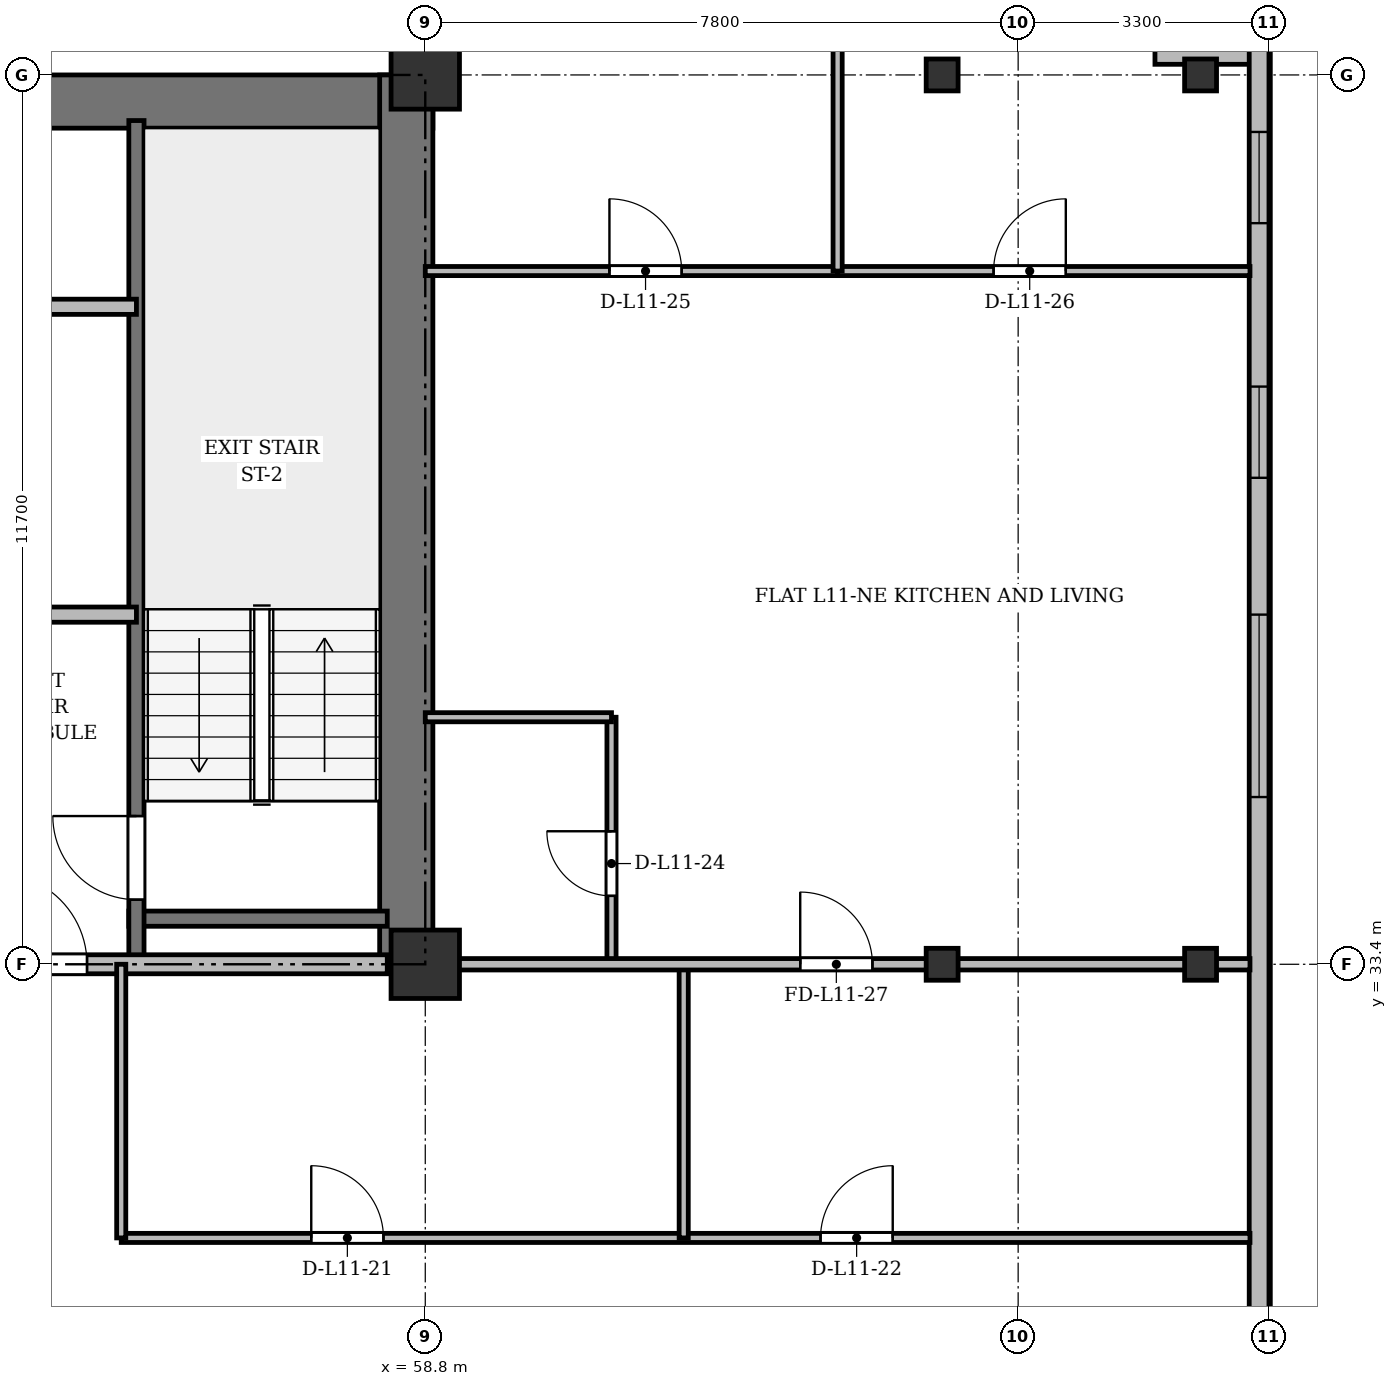
"""IFC4 building model, lengths in metres.
Left out: names, types, materials, properties, quantities, classifications, styles, units other than length and angle.
Written with IfcOpenShell. Run it as: python <this file> out.ifc"""

import sys

from ifc_helpers import new_model, si_unit, direction, frame, frame_2d, origin, origin_2d, place, context, subcontext, project, spatial, rectangle, i_section, extrude, source, transform, mapped, element, fill, save


model = new_model("IFC4")
c1 = context("Model", 3, precision=1e-05, world=origin(), true_north=direction((0.0, 1.0)))
c2 = subcontext(c1, "Body", "Model", "MODEL_VIEW")
j1 = project(units=[si_unit("LENGTHUNIT", "METRE"), si_unit("PLANEANGLEUNIT", "RADIAN")], contexts=[c1])
p1 = place(None, origin())
s1 = spatial("IfcSite", under=j1, at=p1, CompositionType="ELEMENT")
p2 = place(p1, origin())
s2 = spatial("IfcBuilding", under=s1, at=p2, CompositionType="ELEMENT")
p3 = place(p2, frame((0.0, 0.0, 45.1)))
s3 = spatial("IfcBuildingStorey", under=s2, at=p3, CompositionType="ELEMENT", Elevation=45.1)
m1 = source(origin(), c2, "Body", "SweptSolid", [
    extrude(rectangle(XDim=0.9, YDim=0.9, at=origin_2d()), origin(), (0.0, 0.0, 1.0), 3.6),
])
for number, where, z_axis, x_axis in (
    (1, (58.8, 33.4, 0.0), (0.0, 0.0, 1.0), (1.0, 0.0, 0.0)),
    (2, (58.8, 45.1, 0.0), (0.0, 0.0, 1.0), (1.0, 0.0, 0.0)),
):
    element("IfcColumn", number, at=place(p3, frame(where, z_axis=z_axis, x_axis=x_axis)), inside=s3, PredefinedType="COLUMN", context=c2, shape_type="MappedRepresentation", body=[
        mapped(m1, transform((0.0, 0.0, 0.0), x_axis=(1.0, 0.0, 0.0), y_axis=(0.0, 1.0, 0.0), z_axis=(0.0, 0.0, 1.0), scale=1.0)),
    ])
m2 = source(origin(), c2, "Body", "SweptSolid", [
    extrude(i_section(OverallWidth=0.42, OverallDepth=0.42, WebThickness=0.026, FlangeThickness=0.04, at=origin_2d()), origin(), (0.0, 0.0, 1.0), 3.6),
])
for number, where, z_axis, x_axis in (
    (3, (65.6, 33.4, 0.0), (0.0, 0.0, 1.0), (1.0, 0.0, 0.0)),
    (4, (65.6, 45.1, 0.0), (0.0, 0.0, 1.0), (1.0, 0.0, 0.0)),
    (5, (69.0, 33.4, 0.0), (0.0, 0.0, 1.0), (1.0, 0.0, 0.0)),
    (6, (69.0, 45.1, 0.0), (0.0, 0.0, 1.0), (1.0, 0.0, 0.0)),
):
    element("IfcColumn", number, at=place(p3, frame(where, z_axis=z_axis, x_axis=x_axis)), inside=s3, PredefinedType="COLUMN", context=c2, shape_type="MappedRepresentation", body=[
        mapped(m2, transform((0.0, 0.0, 0.0), x_axis=(1.0, 0.0, 0.0), y_axis=(0.0, 1.0, 0.0), z_axis=(0.0, 0.0, 1.0), scale=1.0)),
    ])
p4 = place(p3, frame((68.4, 45.37, 0.0), z_axis=(0.0, 0.0, 1.0), x_axis=(1.0, 0.0, 0.0)))
e7 = element("IfcWall", 7, at=p4, inside=s3, PredefinedType="SOLIDWALL", context=c2, shape_type="SweptSolid", body=[
    extrude(rectangle(XDim=1.5, YDim=0.26, at=frame_2d((0.75, 0.0))), origin(), (0.0, 0.0, 1.0), 2.69),
])
p5 = place(p3, frame((69.77, 45.5, 0.0), z_axis=(0.0, 0.0, 1.0), x_axis=(0.0, -1.0, 0.0)))
e8 = element("IfcWall", 8, at=p5, inside=s3, PredefinedType="SOLIDWALL", context=c2, shape_type="SweptSolid", body=[
    extrude(rectangle(XDim=39.6, YDim=0.26, at=frame_2d((19.8, 0.0))), origin(), (0.0, 0.0, 1.0), 3.34),
])
p6 = place(p5, frame((36.95, 0.0, 0.92)))
e9 = element("IfcOpeningElement", 9, at=p6, cuts=e8, PredefinedType="OPENING", context=c2, shape_type="SweptSolid", body=[
    extrude(rectangle(XDim=1.2, YDim=1.65, at=frame_2d((0.6, 0.825))), frame((0.0, 0.14, 0.0), z_axis=(0.0, -1.0, 0.0), x_axis=(1.0, 0.0, 0.0)), (0.0, 0.0, 1.0), 0.28),
])
p7 = place(p5, frame((32.9, 0.0, 0.92)))
e10 = element("IfcOpeningElement", 10, at=p7, cuts=e8, PredefinedType="OPENING", context=c2, shape_type="SweptSolid", body=[
    extrude(rectangle(XDim=2.4, YDim=2.1, at=frame_2d((1.2, 1.05))), frame((0.0, 0.14, 0.0), z_axis=(0.0, -1.0, 0.0), x_axis=(1.0, 0.0, 0.0)), (0.0, 0.0, 1.0), 0.28),
])
p8 = place(p5, frame((28.7, 0.0, 0.92)))
e11 = element("IfcOpeningElement", 11, at=p8, cuts=e8, PredefinedType="OPENING", context=c2, shape_type="SweptSolid", body=[
    extrude(rectangle(XDim=2.4, YDim=2.1, at=frame_2d((1.2, 1.05))), frame((0.0, 0.14, 0.0), z_axis=(0.0, -1.0, 0.0), x_axis=(1.0, 0.0, 0.0)), (0.0, 0.0, 1.0), 0.28),
])
p9 = place(p5, frame((21.5, 0.0, 0.92)))
e12 = element("IfcOpeningElement", 12, at=p9, cuts=e8, PredefinedType="OPENING", context=c2, shape_type="SweptSolid", body=[
    extrude(rectangle(XDim=2.4, YDim=2.1, at=frame_2d((1.2, 1.05))), frame((0.0, 0.14, 0.0), z_axis=(0.0, -1.0, 0.0), x_axis=(1.0, 0.0, 0.0)), (0.0, 0.0, 1.0), 0.28),
])
p10 = place(p5, frame((7.5, 0.0, 0.92)))
e13 = element("IfcOpeningElement", 13, at=p10, cuts=e8, PredefinedType="OPENING", context=c2, shape_type="SweptSolid", body=[
    extrude(rectangle(XDim=2.4, YDim=2.1, at=frame_2d((1.2, 1.05))), frame((0.0, 0.14, 0.0), z_axis=(0.0, -1.0, 0.0), x_axis=(1.0, 0.0, 0.0)), (0.0, 0.0, 1.0), 0.28),
])
p11 = place(p5, frame((4.5, 0.0, 0.92)))
e14 = element("IfcOpeningElement", 14, at=p11, cuts=e8, PredefinedType="OPENING", context=c2, shape_type="SweptSolid", body=[
    extrude(rectangle(XDim=1.2, YDim=1.65, at=frame_2d((0.6, 0.825))), frame((0.0, 0.14, 0.0), z_axis=(0.0, -1.0, 0.0), x_axis=(1.0, 0.0, 0.0)), (0.0, 0.0, 1.0), 0.28),
])
p12 = place(p5, frame((1.15, 0.0, 0.92)))
e15 = element("IfcOpeningElement", 15, at=p12, cuts=e8, PredefinedType="OPENING", context=c2, shape_type="SweptSolid", body=[
    extrude(rectangle(XDim=1.2, YDim=1.65, at=frame_2d((0.6, 0.825))), frame((0.0, 0.14, 0.0), z_axis=(0.0, -1.0, 0.0), x_axis=(1.0, 0.0, 0.0)), (0.0, 0.0, 1.0), 0.28),
])
p13 = place(p3, frame((15.5, 44.75, 0.0), z_axis=(0.0, 0.0, 1.0), x_axis=(1.0, 0.0, 0.0)))
e16 = element("IfcWall", 16, at=p13, inside=s3, PredefinedType="SHEAR", context=c2, shape_type="SweptSolid", body=[
    extrude(rectangle(XDim=43.4, YDim=0.7, at=frame_2d((21.7, 0.0))), origin(), (0.0, 0.0, 1.0), 3.34),
])
p14 = place(p3, frame((58.55, 33.4, 0.0), z_axis=(0.0, 0.0, 1.0), x_axis=(0.0, 1.0, 0.0)))
e17 = element("IfcWall", 17, at=p14, inside=s3, PredefinedType="SHEAR", context=c2, shape_type="SweptSolid", body=[
    extrude(rectangle(XDim=11.7, YDim=0.7, at=frame_2d((5.85, 0.0))), origin(), (0.0, 0.0, 1.0), 3.34),
])
p15 = place(p3, frame((54.9, 34.0, 0.0), z_axis=(0.0, 0.0, 1.0), x_axis=(1.0, 0.0, 0.0)))
e18 = element("IfcWall", 18, at=p15, inside=s3, PredefinedType="SHEAR", context=c2, shape_type="SweptSolid", body=[
    extrude(rectangle(XDim=3.4, YDim=0.2, at=frame_2d((1.7, 0.0))), origin(), (0.0, 0.0, 1.0), 3.34),
])
p16 = place(p3, frame((55.0, 33.4, 0.0), z_axis=(0.0, 0.0, 1.0), x_axis=(0.0, 1.0, 0.0)))
e19 = element("IfcWall", 19, at=p16, inside=s3, PredefinedType="SHEAR", context=c2, shape_type="SweptSolid", body=[
    extrude(rectangle(XDim=11.1, YDim=0.2, at=frame_2d((5.55, 0.0))), origin(), (0.0, 0.0, 1.0), 3.34),
])
p17 = place(p16, frame((0.85, 0.0, 0.0)))
e20 = element("IfcOpeningElement", 20, at=p17, cuts=e19, PredefinedType="OPENING", context=c2, shape_type="SweptSolid", body=[
    extrude(rectangle(XDim=1.1, YDim=2.15, at=frame_2d((0.55, 1.075))), frame((0.0, 0.11, 0.0), z_axis=(0.0, -1.0, 0.0), x_axis=(1.0, 0.0, 0.0)), (0.0, 0.0, 1.0), 0.22),
])
p18 = place(p3, frame((47.15, 42.05, 0.0), z_axis=(0.0, 0.0, 1.0), x_axis=(1.0, 0.0, 0.0)))
e21 = element("IfcWall", 21, at=p18, inside=s3, PredefinedType="SOLIDWALL", context=c2, shape_type="SweptSolid", body=[
    extrude(rectangle(XDim=7.85, YDim=0.2, at=frame_2d((3.925, 0.0))), origin(), (0.0, 0.0, 1.0), 2.752),
])
p19 = place(p18, frame((0.75, 0.0, 0.0)))
e22 = element("IfcOpeningElement", 22, at=p19, cuts=e21, PredefinedType="OPENING", context=c2, shape_type="SweptSolid", body=[
    extrude(rectangle(XDim=0.9, YDim=2.1, at=frame_2d((0.45, 1.05))), frame((0.0, 0.11, 0.0), z_axis=(0.0, -1.0, 0.0), x_axis=(1.0, 0.0, 0.0)), (0.0, 0.0, 1.0), 0.22),
])
p20 = place(p18, frame((3.85, 0.0, 0.0)))
e23 = element("IfcOpeningElement", 23, at=p20, cuts=e21, PredefinedType="OPENING", context=c2, shape_type="SweptSolid", body=[
    extrude(rectangle(XDim=0.9, YDim=2.1, at=frame_2d((0.45, 1.05))), frame((0.0, 0.11, 0.0), z_axis=(0.0, -1.0, 0.0), x_axis=(1.0, 0.0, 0.0)), (0.0, 0.0, 1.0), 0.22),
])
p21 = place(p3, frame((52.45, 38.0, 0.0), z_axis=(0.0, 0.0, 1.0), x_axis=(1.0, 0.0, 0.0)))
e24 = element("IfcWall", 24, at=p21, inside=s3, PredefinedType="PARTITIONING", context=c2, shape_type="SweptSolid", body=[
    extrude(rectangle(XDim=2.55, YDim=0.2, at=frame_2d((1.275, 0.0))), origin(), (0.0, 0.0, 1.0), 3.34),
])
p22 = place(p3, frame((47.15, 33.4, 0.0), z_axis=(0.0, 0.0, 1.0), x_axis=(1.0, 0.0, 0.0)))
e25 = element("IfcWall", 25, at=p22, inside=s3, PredefinedType="PARTITIONING", context=c2, shape_type="SweptSolid", body=[
    extrude(rectangle(XDim=11.15, YDim=0.25, at=frame_2d((5.575, 0.0))), origin(), (0.0, 0.0, 1.0), 2.69),
])
p23 = place(p22, frame((0.7, 0.0, 0.0)))
e26 = element("IfcOpeningElement", 26, at=p23, cuts=e25, PredefinedType="OPENING", context=c2, shape_type="SweptSolid", body=[
    extrude(rectangle(XDim=0.95, YDim=2.15, at=frame_2d((0.475, 1.075))), frame((0.0, 0.135, 0.0), z_axis=(0.0, -1.0, 0.0), x_axis=(1.0, 0.0, 0.0)), (0.0, 0.0, 1.0), 0.27),
])
p24 = place(p22, frame((6.0, 0.0, 0.0)))
e27 = element("IfcOpeningElement", 27, at=p24, cuts=e25, PredefinedType="OPENING", context=c2, shape_type="SweptSolid", body=[
    extrude(rectangle(XDim=1.2, YDim=2.15, at=frame_2d((0.6, 1.075))), frame((0.0, 0.135, 0.0), z_axis=(0.0, -1.0, 0.0), x_axis=(1.0, 0.0, 0.0)), (0.0, 0.0, 1.0), 0.27),
])
p25 = place(p3, frame((54.8, 29.8, 0.0), z_axis=(0.0, 0.0, 1.0), x_axis=(1.0, 0.0, 0.0)))
e28 = element("IfcWall", 28, at=p25, inside=s3, PredefinedType="PARTITIONING", context=c2, shape_type="SweptSolid", body=[
    extrude(rectangle(XDim=14.85, YDim=0.12, at=frame_2d((7.425, 0.0))), origin(), (0.0, 0.0, 1.0), 2.752),
])
p26 = place(p25, frame((2.5, 0.0, 0.0)))
e29 = element("IfcOpeningElement", 29, at=p26, cuts=e28, PredefinedType="OPENING", context=c2, shape_type="SweptSolid", body=[
    extrude(rectangle(XDim=0.95, YDim=2.15, at=frame_2d((0.475, 1.075))), frame((0.0, 0.07, 0.0), z_axis=(0.0, -1.0, 0.0), x_axis=(1.0, 0.0, 0.0)), (0.0, 0.0, 1.0), 0.14),
])
p27 = place(p25, frame((9.2, 0.0, 0.0)))
e30 = element("IfcOpeningElement", 30, at=p27, cuts=e28, PredefinedType="OPENING", context=c2, shape_type="SweptSolid", body=[
    extrude(rectangle(XDim=0.95, YDim=2.15, at=frame_2d((0.475, 1.075))), frame((0.0, 0.07, 0.0), z_axis=(0.0, -1.0, 0.0), x_axis=(1.0, 0.0, 0.0)), (0.0, 0.0, 1.0), 0.14),
])
for number, where, z_axis, x_axis in (
    (31, (62.2, 29.8, 0.0), (0.0, 0.0, 1.0), (0.0, 1.0, 0.0)),
    (32, (54.8, 29.8, 0.0), (0.0, 0.0, 1.0), (0.0, 1.0, 0.0)),
):
    element("IfcWall", number, at=place(p3, frame(where, z_axis=z_axis, x_axis=x_axis)), inside=s3, PredefinedType="PARTITIONING", context=c2, shape_type="SweptSolid", body=[
        extrude(rectangle(XDim=3.6, YDim=0.12, at=frame_2d((1.8, 0.0))), origin(), (0.0, 0.0, 1.0), 2.69),
    ])
p28 = place(p3, frame((61.25, 33.4, 0.0), z_axis=(0.0, 0.0, 1.0), x_axis=(0.0, 1.0, 0.0)))
e33 = element("IfcWall", 33, at=p28, inside=s3, PredefinedType="PARTITIONING", context=c2, shape_type="SweptSolid", body=[
    extrude(rectangle(XDim=3.25, YDim=0.12, at=frame_2d((1.625, 0.0))), origin(), (0.0, 0.0, 1.0), 2.69),
])
p29 = place(p28, frame((0.9, 0.0, 0.0)))
e34 = element("IfcOpeningElement", 34, at=p29, cuts=e33, PredefinedType="OPENING", context=c2, shape_type="SweptSolid", body=[
    extrude(rectangle(XDim=0.85, YDim=2.1, at=frame_2d((0.425, 1.05))), frame((0.0, 0.07, 0.0), z_axis=(0.0, -1.0, 0.0), x_axis=(1.0, 0.0, 0.0)), (0.0, 0.0, 1.0), 0.14),
])
p30 = place(p3, frame((58.8, 36.65, 0.0), z_axis=(0.0, 0.0, 1.0), x_axis=(1.0, 0.0, 0.0)))
e35 = element("IfcWall", 35, at=p30, inside=s3, PredefinedType="PARTITIONING", context=c2, shape_type="SweptSolid", body=[
    extrude(rectangle(XDim=2.45, YDim=0.12, at=frame_2d((1.225, 0.0))), origin(), (0.0, 0.0, 1.0), 2.752),
])
p31 = place(p3, frame((58.8, 42.52, 0.0), z_axis=(0.0, 0.0, 1.0), x_axis=(1.0, 0.0, 0.0)))
e36 = element("IfcWall", 36, at=p31, inside=s3, PredefinedType="PARTITIONING", context=c2, shape_type="SweptSolid", body=[
    extrude(rectangle(XDim=5.425, YDim=0.12, at=frame_2d((2.712, 0.0))), origin(), (0.0, 0.0, 1.0), 2.752),
])
p32 = place(p31, frame((2.423, 0.0, 0.0)))
e37 = element("IfcOpeningElement", 37, at=p32, cuts=e36, PredefinedType="OPENING", context=c2, shape_type="SweptSolid", body=[
    extrude(rectangle(XDim=0.95, YDim=2.15, at=frame_2d((0.475, 1.075))), frame((0.0, 0.07, 0.0), z_axis=(0.0, -1.0, 0.0), x_axis=(1.0, 0.0, 0.0)), (0.0, 0.0, 1.0), 0.14),
])
p33 = place(p3, frame((64.225, 42.52, 0.0), z_axis=(0.0, 0.0, 1.0), x_axis=(1.0, 0.0, 0.0)))
e38 = element("IfcWall", 38, at=p33, inside=s3, PredefinedType="PARTITIONING", context=c2, shape_type="SweptSolid", body=[
    extrude(rectangle(XDim=5.425, YDim=0.12, at=frame_2d((2.712, 0.0))), origin(), (0.0, 0.0, 1.0), 2.752),
])
p34 = place(p33, frame((2.052, 0.0, 0.0)))
e39 = element("IfcOpeningElement", 39, at=p34, cuts=e38, PredefinedType="OPENING", context=c2, shape_type="SweptSolid", body=[
    extrude(rectangle(XDim=0.95, YDim=2.15, at=frame_2d((0.475, 1.075))), frame((0.0, 0.07, 0.0), z_axis=(0.0, -1.0, 0.0), x_axis=(1.0, 0.0, 0.0)), (0.0, 0.0, 1.0), 0.14),
])
p35 = place(p3, frame((64.225, 42.52, 0.0), z_axis=(0.0, 0.0, 1.0), x_axis=(0.0, 1.0, 0.0)))
e40 = element("IfcWall", 40, at=p35, inside=s3, PredefinedType="PARTITIONING", context=c2, shape_type="SweptSolid", body=[
    extrude(rectangle(XDim=5.72, YDim=0.12, at=frame_2d((2.86, 0.0))), origin(), (0.0, 0.0, 1.0), 2.69),
])
p36 = place(p3, frame((58.8, 33.4, 0.0), z_axis=(0.0, 0.0, 1.0), x_axis=(1.0, 0.0, 0.0)))
e41 = element("IfcWall", 41, at=p36, inside=s3, PredefinedType="PARTITIONING", context=c2, shape_type="SweptSolid", body=[
    extrude(rectangle(XDim=10.85, YDim=0.15, at=frame_2d((5.425, 0.0))), origin(), (0.0, 0.0, 1.0), 2.69),
])
p37 = place(p36, frame((4.933, 0.0, 0.0)))
e42 = element("IfcOpeningElement", 42, at=p37, cuts=e41, PredefinedType="OPENING", context=c2, shape_type="SweptSolid", body=[
    extrude(rectangle(XDim=0.95, YDim=2.15, at=frame_2d((0.475, 1.075))), frame((0.0, 0.085, 0.0), z_axis=(0.0, -1.0, 0.0), x_axis=(1.0, 0.0, 0.0)), (0.0, 0.0, 1.0), 0.17),
])
p38 = place(p3, frame((58.8, 44.75, 0.0), z_axis=(0.0, 0.0, 1.0), x_axis=(0.0, 1.0, 0.0)))
e43 = element("IfcWall", 43, at=p38, inside=s3, PredefinedType="PARTITIONING", context=c2, shape_type="SweptSolid", body=[
    extrude(rectangle(XDim=3.61, YDim=0.15, at=frame_2d((1.805, 0.0))), origin(), (0.0, 0.0, 1.0), 2.752),
])
p39 = place(p38, frame((1.1, 0.0, 0.0)))
e44 = element("IfcOpeningElement", 44, at=p39, cuts=e43, PredefinedType="OPENING", context=c2, shape_type="SweptSolid", body=[
    extrude(rectangle(XDim=0.95, YDim=2.15, at=frame_2d((0.475, 1.075))), frame((0.0, 0.085, 0.0), z_axis=(0.0, -1.0, 0.0), x_axis=(1.0, 0.0, 0.0)), (0.0, 0.0, 1.0), 0.17),
])
m3 = source(origin(), c2, "Body", "SweptSolid", [
    extrude(rectangle(XDim=2.4, YDim=2.1, at=frame_2d((1.2, 1.05))), frame((0.0, 0.03, 0.0), z_axis=(0.0, -1.0, 0.0), x_axis=(1.0, 0.0, 0.0)), (0.0, 0.0, 1.0), 0.06),
])
p40 = place(p10, origin())
e45 = element("IfcWindow", 45, at=p40, inside=s3, PartitioningType="SINGLE_PANEL", PredefinedType="WINDOW", context=c2, shape_type="MappedRepresentation", body=[
    mapped(m3, transform((0.0, 0.0, 0.0), x_axis=(1.0, 0.0, 0.0), y_axis=(0.0, 1.0, 0.0), z_axis=(0.0, 0.0, 1.0), scale=1.0)),
])
fill(e13, e45)
m4 = source(origin(), c2, "Body", "SweptSolid", [
    extrude(rectangle(XDim=1.2, YDim=1.65, at=frame_2d((0.6, 0.825))), frame((0.0, 0.03, 0.0), z_axis=(0.0, -1.0, 0.0), x_axis=(1.0, 0.0, 0.0)), (0.0, 0.0, 1.0), 0.06),
])
p41 = place(p11, origin())
e46 = element("IfcWindow", 46, at=p41, inside=s3, PartitioningType="SINGLE_PANEL", PredefinedType="WINDOW", context=c2, shape_type="MappedRepresentation", body=[
    mapped(m4, transform((0.0, 0.0, 0.0), x_axis=(1.0, 0.0, 0.0), y_axis=(0.0, 1.0, 0.0), z_axis=(0.0, 0.0, 1.0), scale=1.0)),
])
fill(e14, e46)
p42 = place(p12, origin())
e47 = element("IfcWindow", 47, at=p42, inside=s3, PartitioningType="SINGLE_PANEL", PredefinedType="WINDOW", context=c2, shape_type="MappedRepresentation", body=[
    mapped(m4, transform((0.0, 0.0, 0.0), x_axis=(1.0, 0.0, 0.0), y_axis=(0.0, 1.0, 0.0), z_axis=(0.0, 0.0, 1.0), scale=1.0)),
])
fill(e15, e47)
m5 = source(origin(), c2, "Body", "SweptSolid", [
    extrude(rectangle(XDim=1.1, YDim=2.15, at=frame_2d((0.55, 1.075))), frame((0.0, 0.025, 0.0), z_axis=(0.0, -1.0, 0.0), x_axis=(1.0, 0.0, 0.0)), (0.0, 0.0, 1.0), 0.05),
])
p43 = place(p17, origin())
e48 = element("IfcDoor", 48, at=p43, inside=s3, OperationType="SINGLE_SWING_RIGHT", PredefinedType="DOOR", context=c2, shape_type="MappedRepresentation", body=[
    mapped(m5, transform((0.0, 0.0, 0.0), x_axis=(1.0, 0.0, 0.0), y_axis=(0.0, 1.0, 0.0), z_axis=(0.0, 0.0, 1.0), scale=1.0)),
])
fill(e20, e48)
m6 = source(origin(), c2, "Body", "SweptSolid", [
    extrude(rectangle(XDim=1.2, YDim=2.15, at=frame_2d((0.6, 1.075))), frame((0.0, 0.025, 0.0), z_axis=(0.0, -1.0, 0.0), x_axis=(1.0, 0.0, 0.0)), (0.0, 0.0, 1.0), 0.05),
])
p44 = place(p24, origin())
e49 = element("IfcDoor", 49, at=p44, inside=s3, OperationType="SINGLE_SWING_LEFT", PredefinedType="DOOR", context=c2, shape_type="MappedRepresentation", body=[
    mapped(m6, transform((0.0, 0.0, 0.0), x_axis=(1.0, 0.0, 0.0), y_axis=(0.0, 1.0, 0.0), z_axis=(0.0, 0.0, 1.0), scale=1.0)),
])
fill(e27, e49)
m7 = source(origin(), c2, "Body", "SweptSolid", [
    extrude(rectangle(XDim=0.95, YDim=2.15, at=frame_2d((0.475, 1.075))), frame((0.0, 0.025, 0.0), z_axis=(0.0, -1.0, 0.0), x_axis=(1.0, 0.0, 0.0)), (0.0, 0.0, 1.0), 0.05),
])
p45 = place(p26, origin())
e50 = element("IfcDoor", 50, at=p45, inside=s3, OperationType="SINGLE_SWING_LEFT", PredefinedType="DOOR", context=c2, shape_type="MappedRepresentation", body=[
    mapped(m7, transform((0.0, 0.0, 0.0), x_axis=(1.0, 0.0, 0.0), y_axis=(0.0, 1.0, 0.0), z_axis=(0.0, 0.0, 1.0), scale=1.0)),
])
fill(e29, e50)
p46 = place(p27, origin())
e51 = element("IfcDoor", 51, at=p46, inside=s3, OperationType="SINGLE_SWING_RIGHT", PredefinedType="DOOR", context=c2, shape_type="MappedRepresentation", body=[
    mapped(m7, transform((0.0, 0.0, 0.0), x_axis=(1.0, 0.0, 0.0), y_axis=(0.0, 1.0, 0.0), z_axis=(0.0, 0.0, 1.0), scale=1.0)),
])
fill(e30, e51)
m8 = source(origin(), c2, "Body", "SweptSolid", [
    extrude(rectangle(XDim=0.85, YDim=2.1, at=frame_2d((0.425, 1.05))), frame((0.0, 0.025, 0.0), z_axis=(0.0, -1.0, 0.0), x_axis=(1.0, 0.0, 0.0)), (0.0, 0.0, 1.0), 0.05),
])
p47 = place(p29, origin())
e52 = element("IfcDoor", 52, at=p47, inside=s3, OperationType="SINGLE_SWING_RIGHT", PredefinedType="DOOR", context=c2, shape_type="MappedRepresentation", body=[
    mapped(m8, transform((0.0, 0.0, 0.0), x_axis=(1.0, 0.0, 0.0), y_axis=(0.0, 1.0, 0.0), z_axis=(0.0, 0.0, 1.0), scale=1.0)),
])
fill(e34, e52)
p48 = place(p32, origin())
e53 = element("IfcDoor", 53, at=p48, inside=s3, OperationType="SINGLE_SWING_LEFT", PredefinedType="DOOR", context=c2, shape_type="MappedRepresentation", body=[
    mapped(m7, transform((0.0, 0.0, 0.0), x_axis=(1.0, 0.0, 0.0), y_axis=(0.0, 1.0, 0.0), z_axis=(0.0, 0.0, 1.0), scale=1.0)),
])
fill(e37, e53)
p49 = place(p34, origin())
e54 = element("IfcDoor", 54, at=p49, inside=s3, OperationType="SINGLE_SWING_RIGHT", PredefinedType="DOOR", context=c2, shape_type="MappedRepresentation", body=[
    mapped(m7, transform((0.0, 0.0, 0.0), x_axis=(1.0, 0.0, 0.0), y_axis=(0.0, 1.0, 0.0), z_axis=(0.0, 0.0, 1.0), scale=1.0)),
])
fill(e39, e54)
p50 = place(p37, origin())
e55 = element("IfcDoor", 55, at=p50, inside=s3, OperationType="SINGLE_SWING_LEFT", PredefinedType="DOOR", context=c2, shape_type="MappedRepresentation", body=[
    mapped(m7, transform((0.0, 0.0, 0.0), x_axis=(1.0, 0.0, 0.0), y_axis=(0.0, 1.0, 0.0), z_axis=(0.0, 0.0, 1.0), scale=1.0)),
])
fill(e42, e55)
save(model, sys.argv[1])
